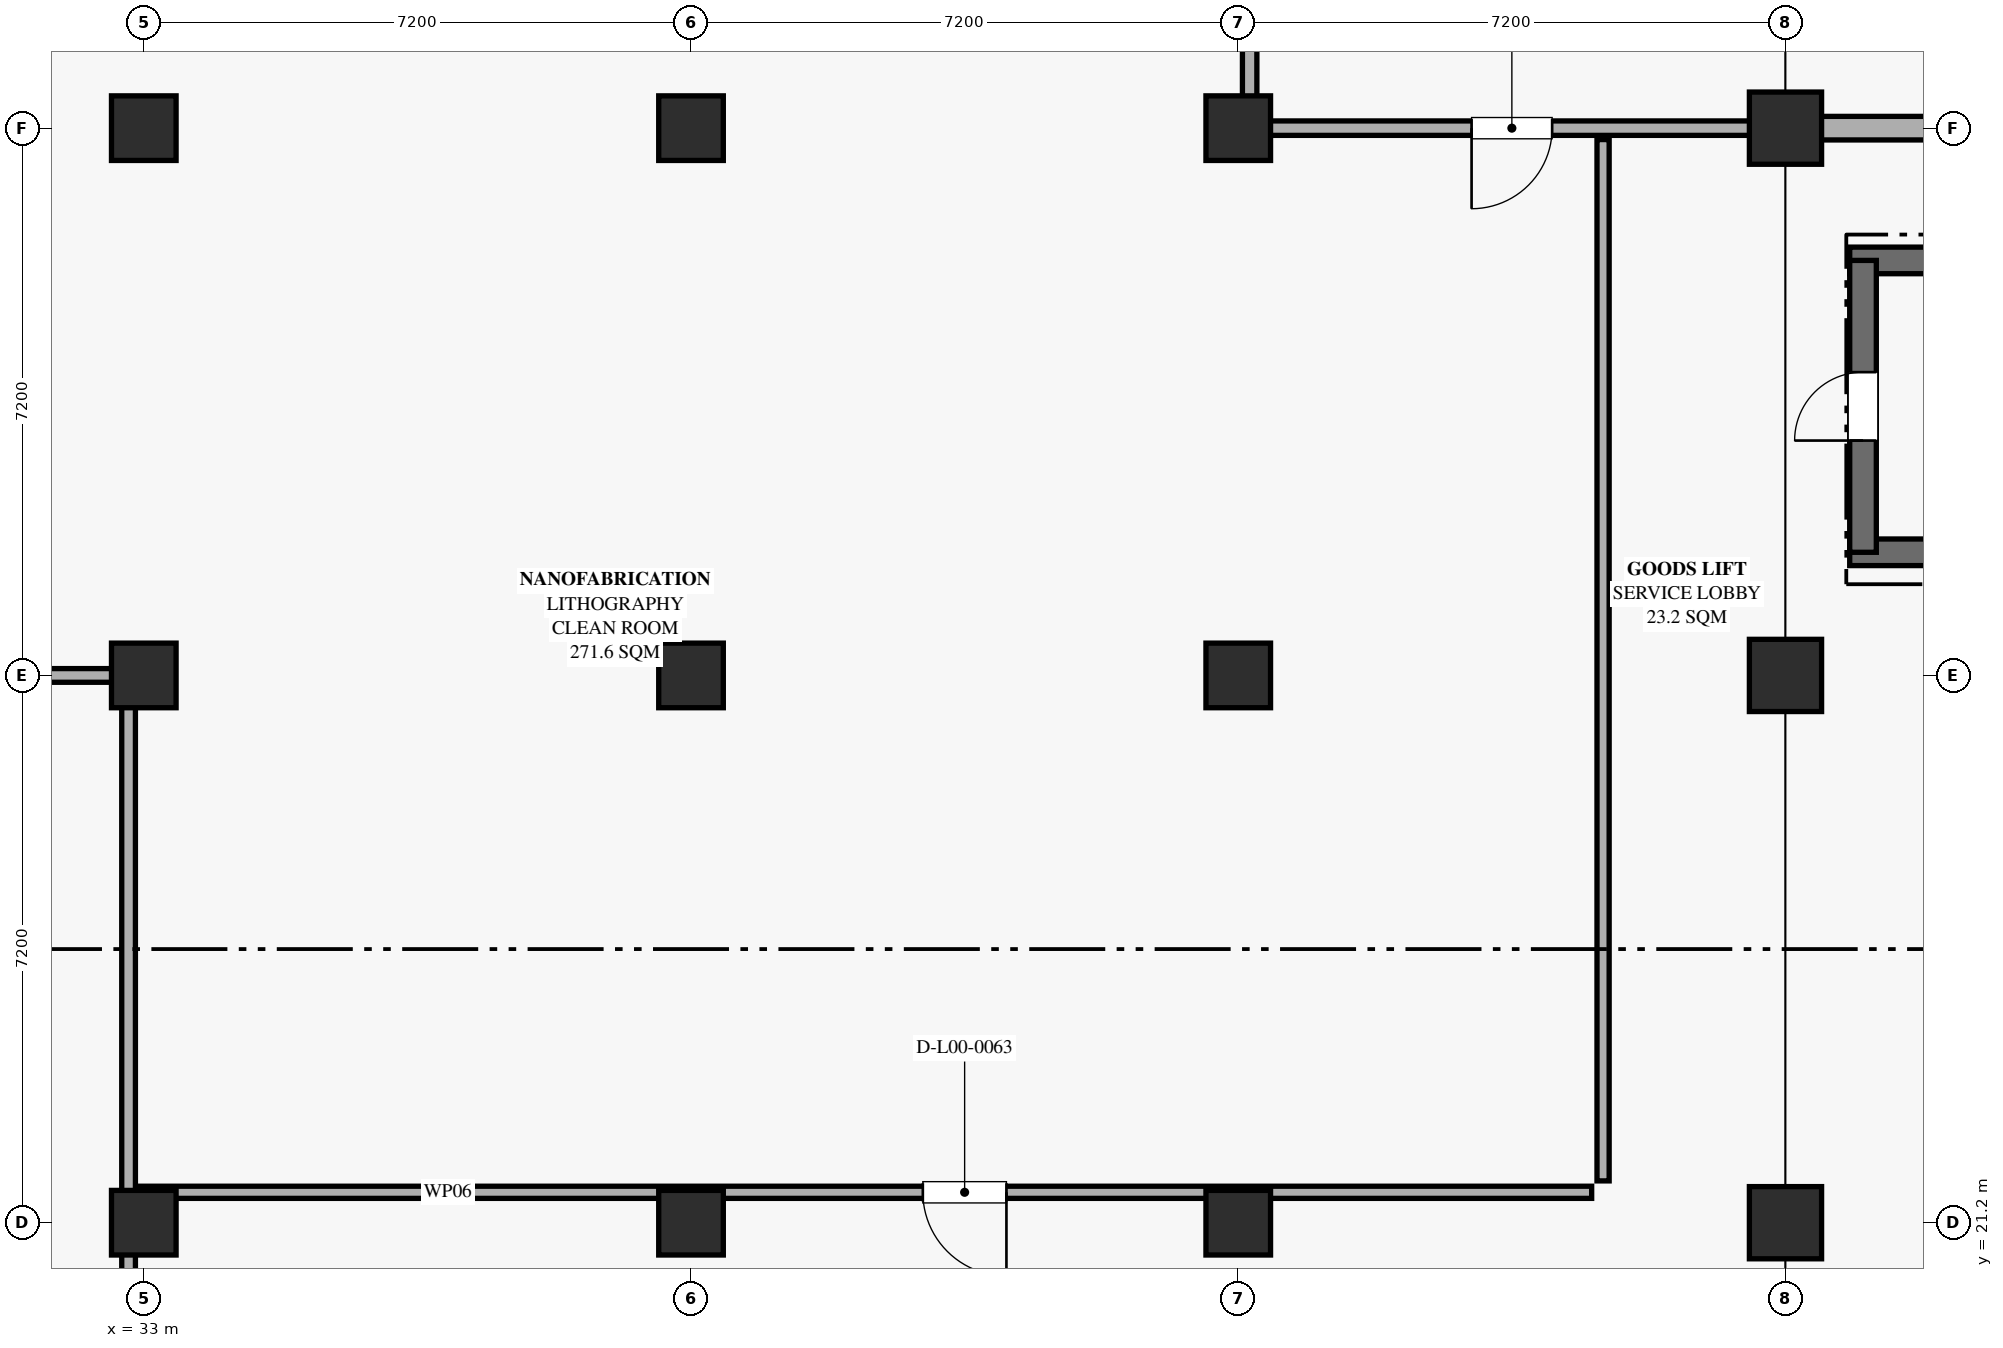
"""IFC4 building model, lengths in metres.
Left out: names, types, materials, properties, quantities, classifications, styles, units other than length and angle.
Written with IfcOpenShell. Run it as: python <this file> out.ifc"""

import sys

from ifc_helpers import new_model, si_unit, direction, frame, frame_2d, origin, origin_2d, place, context, subcontext, project, spatial, rectangle, extrude, element, fill, save


model = new_model("IFC4")
c1 = context("Model", 3, precision=1e-05, world=origin(), true_north=direction((0.0, 1.0)))
c2 = subcontext(c1, "Body", "Model", "MODEL_VIEW")
j1 = project(units=[si_unit("LENGTHUNIT", "METRE"), si_unit("PLANEANGLEUNIT", "RADIAN")], contexts=[c1])
p1 = place(None, origin())
s1 = spatial("IfcSite", under=j1, at=p1, CompositionType="ELEMENT")
p2 = place(p1, origin())
s2 = spatial("IfcBuilding", under=s1, at=p2, CompositionType="ELEMENT")
p3 = place(p2, origin())
s3 = spatial("IfcBuildingStorey", under=s2, at=p3, CompositionType="ELEMENT", Elevation=0.0)
for number, where, z_axis, x_axis in (
    (1, (33.0, 21.2, 0.0), (0.0, 0.0, 1.0), (1.0, 0.0, 0.0)),
    (2, (40.2, 21.2, 0.0), (0.0, 0.0, 1.0), (1.0, 0.0, 0.0)),
    (3, (47.4, 21.2, 0.0), (0.0, 0.0, 1.0), (1.0, 0.0, 0.0)),
):
    element("IfcColumn", number, at=place(p3, frame(where, z_axis=z_axis, x_axis=x_axis)), inside=s3, PredefinedType="COLUMN", context=c2, shape_type="SweptSolid", body=[
        extrude(rectangle(XDim=0.85, YDim=0.85, at=origin_2d()), origin(), (0.0, 0.0, 1.0), 5.4),
    ])
p4 = place(p3, frame((54.6, 21.2, 0.0), z_axis=(0.0, 0.0, 1.0), x_axis=(1.0, 0.0, 0.0)))
e4 = element("IfcColumn", 4, at=p4, inside=s3, PredefinedType="COLUMN", context=c2, shape_type="SweptSolid", body=[
    extrude(rectangle(XDim=0.95, YDim=0.95, at=origin_2d()), origin(), (0.0, 0.0, 1.0), 5.4),
])
for number, where, z_axis, x_axis in (
    (5, (33.0, 28.4, 0.0), (0.0, 0.0, 1.0), (1.0, 0.0, 0.0)),
    (6, (40.2, 28.4, 0.0), (0.0, 0.0, 1.0), (1.0, 0.0, 0.0)),
    (7, (47.4, 28.4, 0.0), (0.0, 0.0, 1.0), (1.0, 0.0, 0.0)),
):
    element("IfcColumn", number, at=place(p3, frame(where, z_axis=z_axis, x_axis=x_axis)), inside=s3, PredefinedType="COLUMN", context=c2, shape_type="SweptSolid", body=[
        extrude(rectangle(XDim=0.85, YDim=0.85, at=origin_2d()), origin(), (0.0, 0.0, 1.0), 5.4),
    ])
p5 = place(p3, frame((54.6, 28.4, 0.0), z_axis=(0.0, 0.0, 1.0), x_axis=(1.0, 0.0, 0.0)))
e8 = element("IfcColumn", 8, at=p5, inside=s3, PredefinedType="COLUMN", context=c2, shape_type="SweptSolid", body=[
    extrude(rectangle(XDim=0.95, YDim=0.95, at=origin_2d()), origin(), (0.0, 0.0, 1.0), 5.4),
])
for number, where, z_axis, x_axis in (
    (9, (33.0, 35.6, 0.0), (0.0, 0.0, 1.0), (1.0, 0.0, 0.0)),
    (10, (40.2, 35.6, 0.0), (0.0, 0.0, 1.0), (1.0, 0.0, 0.0)),
    (11, (47.4, 35.6, 0.0), (0.0, 0.0, 1.0), (1.0, 0.0, 0.0)),
):
    element("IfcColumn", number, at=place(p3, frame(where, z_axis=z_axis, x_axis=x_axis)), inside=s3, PredefinedType="COLUMN", context=c2, shape_type="SweptSolid", body=[
        extrude(rectangle(XDim=0.85, YDim=0.85, at=origin_2d()), origin(), (0.0, 0.0, 1.0), 5.4),
    ])
p6 = place(p3, frame((54.6, 35.6, 0.0), z_axis=(0.0, 0.0, 1.0), x_axis=(1.0, 0.0, 0.0)))
e12 = element("IfcColumn", 12, at=p6, inside=s3, PredefinedType="COLUMN", context=c2, shape_type="SweptSolid", body=[
    extrude(rectangle(XDim=0.95, YDim=0.95, at=origin_2d()), origin(), (0.0, 0.0, 1.0), 5.4),
])
p7 = place(p3, frame((55.06, 35.6, 0.0), z_axis=(0.0, 0.0, 1.0), x_axis=(1.0, 0.0, 0.0)))
e13 = element("IfcWall", 13, at=p7, inside=s3, PredefinedType="SOLIDWALL", context=c2, shape_type="SweptSolid", body=[
    extrude(rectangle(XDim=6.28, YDim=0.31, at=frame_2d((3.14, 0.0))), origin(), (0.0, 0.0, 1.0), 3.9),
])
p8 = place(p7, frame((2.04, 0.0, 0.9)))
e14 = element("IfcOpeningElement", 14, at=p8, cuts=e13, PredefinedType="OPENING", context=c2, shape_type="SweptSolid", body=[
    extrude(rectangle(XDim=2.2, YDim=2.0, at=frame_2d((1.1, 1.0))), frame((0.0, 0.165, 0.0), z_axis=(0.0, -1.0, 0.0), x_axis=(1.0, 0.0, 0.0)), (0.0, 0.0, 1.0), 0.33),
])
for number, where, z_axis, x_axis in (
    (15, (63.455, 30.02, 0.0), (0.0, 0.0, 1.0), (-1.0, 0.0, 0.0)),
    (16, (55.445, 33.86, 0.0), (0.0, 0.0, 1.0), (1.0, 0.0, 0.0)),
):
    element("IfcWall", number, at=place(p3, frame(where, z_axis=z_axis, x_axis=x_axis)), inside=s3, PredefinedType="SHEAR", context=c2, shape_type="SweptSolid", body=[
        extrude(rectangle(XDim=8.01, YDim=0.35, at=frame_2d((4.005, 0.0))), origin(), (0.0, 0.0, 1.0), 5.13),
    ])
p9 = place(p3, frame((55.62, 30.02, 0.0), z_axis=(0.0, 0.0, 1.0), x_axis=(0.0, 1.0, 0.0)))
e17 = element("IfcWall", 17, at=p9, inside=s3, PredefinedType="SHEAR", context=c2, shape_type="SweptSolid", body=[
    extrude(rectangle(XDim=3.84, YDim=0.35, at=frame_2d((1.92, 0.0))), origin(), (0.0, 0.0, 1.0), 5.13),
])
p10 = place(p9, frame((1.47, 0.0, 0.0)))
e18 = element("IfcOpeningElement", 18, at=p10, cuts=e17, PredefinedType="OPENING", context=c2, shape_type="SweptSolid", body=[
    extrude(rectangle(XDim=0.9, YDim=2.12, at=frame_2d((0.45, 1.06))), frame((0.0, 0.185, 0.0), z_axis=(0.0, -1.0, 0.0), x_axis=(1.0, 0.0, 0.0)), (0.0, 0.0, 1.0), 0.37),
])
p11 = place(p3, frame((54.3, 35.6, 0.0), z_axis=(0.0, 0.0, 1.0), x_axis=(-1.0, 0.0, 0.0)))
e19 = element("IfcWall", 19, at=p11, inside=s3, PredefinedType="PARTITIONING", context=c2, shape_type="SweptSolid", body=[
    extrude(rectangle(XDim=6.6, YDim=0.19, at=frame_2d((3.3, 0.0))), origin(), (0.0, 0.0, 1.0), 3.88),
])
p12 = place(p11, frame((2.77, 0.0, 0.0)))
e20 = element("IfcOpeningElement", 20, at=p12, cuts=e19, PredefinedType="OPENING", context=c2, shape_type="SweptSolid", body=[
    extrude(rectangle(XDim=1.06, YDim=2.12, at=frame_2d((0.53, 1.06))), frame((0.0, 0.105, 0.0), z_axis=(0.0, -1.0, 0.0), x_axis=(1.0, 0.0, 0.0)), (0.0, 0.0, 1.0), 0.21),
])
p13 = place(p3, frame((47.55, 35.75, 0.0), z_axis=(0.0, 0.0, 1.0), x_axis=(0.0, 1.0, 0.0)))
e21 = element("IfcWall", 21, at=p13, inside=s3, PredefinedType="PARTITIONING", context=c2, shape_type="SweptSolid", body=[
    extrude(rectangle(XDim=6.75, YDim=0.19, at=frame_2d((3.375, 0.0))), origin(), (0.0, 0.0, 1.0), 3.88),
])
p14 = place(p3, frame((11.75, 28.4, 0.0), z_axis=(0.0, 0.0, 1.0), x_axis=(1.0, 0.0, 0.0)))
e22 = element("IfcWall", 22, at=p14, inside=s3, PredefinedType="PARTITIONING", context=c2, shape_type="SweptSolid", body=[
    extrude(rectangle(XDim=20.9, YDim=0.18, at=frame_2d((10.45, 0.0))), origin(), (0.0, 0.0, 1.0), 3.88),
])
p15 = place(p3, frame((32.8, 28.25, 0.0), z_axis=(0.0, 0.0, 1.0), x_axis=(0.0, -1.0, 0.0)))
e23 = element("IfcWall", 23, at=p15, inside=s3, PredefinedType="PARTITIONING", context=c2, shape_type="SweptSolid", body=[
    extrude(rectangle(XDim=21.1, YDim=0.18, at=frame_2d((10.55, 0.0))), origin(), (0.0, 0.0, 1.0), 3.88),
])
p16 = place(p15, frame((10.02, 0.0, 0.0)))
e24 = element("IfcOpeningElement", 24, at=p16, cuts=e23, PredefinedType="OPENING", context=c2, shape_type="SweptSolid", body=[
    extrude(rectangle(XDim=1.06, YDim=2.18, at=frame_2d((0.53, 1.09))), frame((0.0, 0.1, 0.0), z_axis=(0.0, -1.0, 0.0), x_axis=(1.0, 0.0, 0.0)), (0.0, 0.0, 1.0), 0.2),
])
p17 = place(p3, frame((52.05, 21.6, 0.0), z_axis=(0.0, 0.0, 1.0), x_axis=(-1.0, 0.0, 0.0)))
e25 = element("IfcWall", 25, at=p17, inside=s3, PredefinedType="PARTITIONING", context=c2, shape_type="SweptSolid", body=[
    extrude(rectangle(XDim=19.1, YDim=0.16, at=frame_2d((9.55, 0.0))), origin(), (0.0, 0.0, 1.0), 3.88),
])
p18 = place(p17, frame((7.7, 0.0, 0.0)))
e26 = element("IfcOpeningElement", 26, at=p18, cuts=e25, PredefinedType="OPENING", context=c2, shape_type="SweptSolid", body=[
    extrude(rectangle(XDim=1.1, YDim=2.12, at=frame_2d((0.55, 1.06))), frame((0.0, 0.09, 0.0), z_axis=(0.0, -1.0, 0.0), x_axis=(1.0, 0.0, 0.0)), (0.0, 0.0, 1.0), 0.18),
])
p19 = place(p3, frame((52.2, 35.45, 0.0), z_axis=(0.0, 0.0, 1.0), x_axis=(0.0, -1.0, 0.0)))
e27 = element("IfcWall", 27, at=p19, inside=s3, PredefinedType="PARTITIONING", context=c2, shape_type="SweptSolid", body=[
    extrude(rectangle(XDim=13.7, YDim=0.16, at=frame_2d((6.85, 0.0))), origin(), (0.0, 0.0, 1.0), 3.88),
])
p20 = place(p10, origin())
e28 = element("IfcDoor", 28, at=p20, inside=s3, OperationType="SINGLE_SWING_LEFT", PredefinedType="DOOR", context=c2, shape_type="SweptSolid", body=[
    extrude(rectangle(XDim=0.9, YDim=2.12, at=frame_2d((0.45, 1.06))), frame((0.0, 0.025, 0.0), z_axis=(0.0, -1.0, 0.0), x_axis=(1.0, 0.0, 0.0)), (0.0, 0.0, 1.0), 0.05),
])
fill(e18, e28)
p21 = place(p12, origin())
e29 = element("IfcDoor", 29, at=p21, inside=s3, OperationType="SINGLE_SWING_RIGHT", PredefinedType="DOOR", context=c2, shape_type="SweptSolid", body=[
    extrude(rectangle(XDim=1.06, YDim=2.12, at=frame_2d((0.53, 1.06))), frame((0.0, 0.025, 0.0), z_axis=(0.0, -1.0, 0.0), x_axis=(1.0, 0.0, 0.0)), (0.0, 0.0, 1.0), 0.05),
])
fill(e20, e29)
p22 = place(p18, origin())
e30 = element("IfcDoor", 30, at=p22, inside=s3, OperationType="SINGLE_SWING_LEFT", PredefinedType="DOOR", context=c2, shape_type="SweptSolid", body=[
    extrude(rectangle(XDim=1.1, YDim=2.12, at=frame_2d((0.55, 1.06))), frame((0.0, 0.025, 0.0), z_axis=(0.0, -1.0, 0.0), x_axis=(1.0, 0.0, 0.0)), (0.0, 0.0, 1.0), 0.05),
])
fill(e26, e30)
save(model, sys.argv[1])
